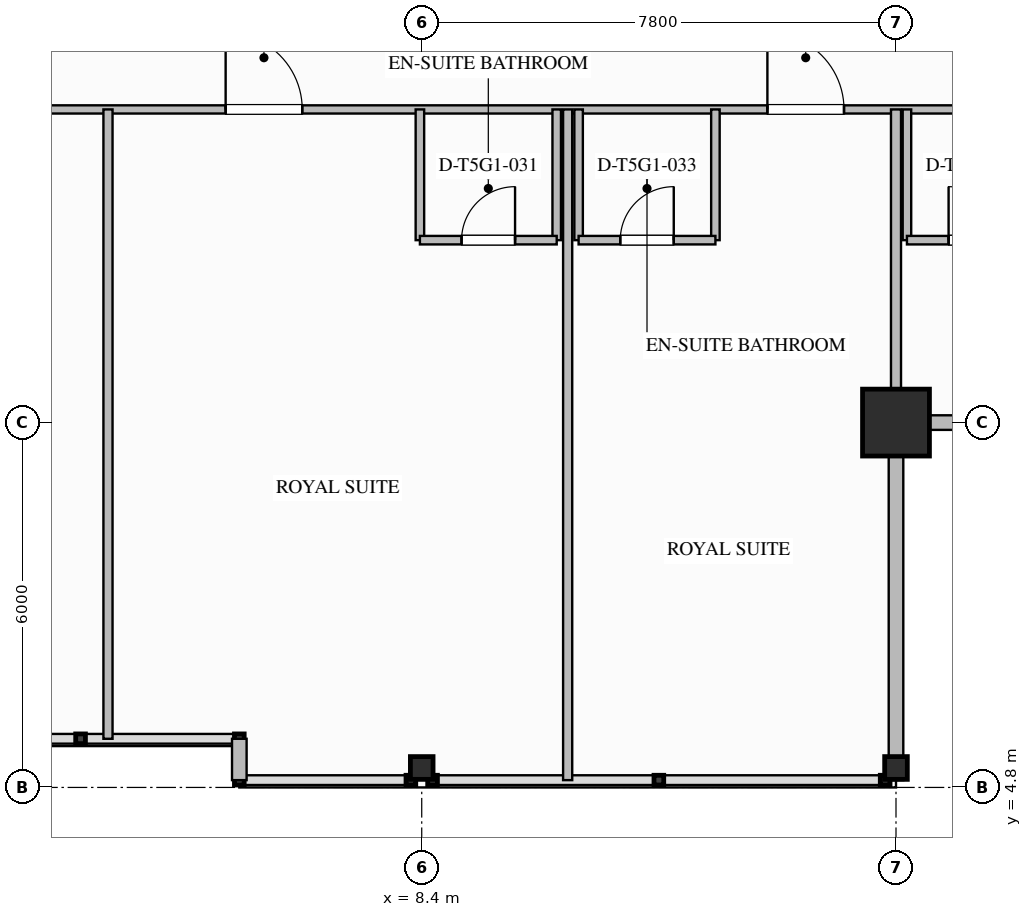
"""IFC4 building model, lengths in metres.
Left out: names, types, materials, properties, quantities, classifications, styles, units other than length and angle.
Written with IfcOpenShell. Run it as: python <this file> out.ifc"""

import sys

from ifc_helpers import new_model, si_unit, direction, frame, frame_2d, origin, origin_2d, place, context, subcontext, project, spatial, rectangle, i_section, extrude, element, fill, save


model = new_model("IFC4")
c1 = context("Model", 3, precision=1e-05, world=origin(), true_north=direction((0.0, 1.0)))
c2 = subcontext(c1, "Body", "Model", "MODEL_VIEW")
j1 = project(units=[si_unit("LENGTHUNIT", "METRE"), si_unit("PLANEANGLEUNIT", "RADIAN")], contexts=[c1])
p1 = place(None, origin())
s1 = spatial("IfcSite", under=j1, at=p1, CompositionType="ELEMENT")
p2 = place(p1, origin())
s2 = spatial("IfcBuilding", under=s1, at=p2, CompositionType="ELEMENT")
p3 = place(p2, frame((0.0, 0.0, 268.65)))
s3 = spatial("IfcBuildingStorey", under=s2, at=p3, CompositionType="ELEMENT", Elevation=268.65)
p4 = place(p3, frame((16.2, 10.8, 0.0), z_axis=(0.0, 0.0, 1.0), x_axis=(1.0, 0.0, 0.0)))
e1 = element("IfcColumn", 1, at=p4, inside=s3, PredefinedType="COLUMN", context=c2, shape_type="SweptSolid", body=[
    extrude(rectangle(XDim=1.1, YDim=1.1, at=origin_2d()), origin(), (0.0, 0.0, 1.0), 3.65),
])
for number, where, z_axis, x_axis in (
    (2, (8.4, 5.12, 0.0), (0.0, 0.0, 1.0), (0.0, 1.0, 0.0)),
    (3, (16.2, 5.12, 0.0), (0.0, 0.0, 1.0), (0.0, 1.0, 0.0)),
):
    element("IfcColumn", number, at=place(p3, frame(where, z_axis=z_axis, x_axis=x_axis)), inside=s3, PredefinedType="COLUMN", context=c2, shape_type="SweptSolid", body=[
        extrude(i_section(OverallWidth=0.374, OverallDepth=0.372, WebThickness=0.016, FlangeThickness=0.026, FilletRadius=0.025, at=origin_2d()), origin(), (0.0, 0.0, 1.0), 3.647),
    ])
for number, where, z_axis, x_axis in (
    (4, (22.08, 10.8, 0.0), (0.0, 0.0, 1.0), (-1.0, 0.0, 0.0)),
    (5, (16.2, 10.8, 0.0), (0.0, 0.0, 1.0), (0.0, -1.0, 0.0)),
):
    element("IfcWall", number, at=place(p3, frame(where, z_axis=z_axis, x_axis=x_axis)), inside=s3, PredefinedType="STANDARD", context=c2, shape_type="SweptSolid", body=[
        extrude(rectangle(XDim=5.88, YDim=0.24, at=frame_2d((2.94, 0.0))), origin(), (0.0, 0.0, 1.0), 2.779),
    ])
p5 = place(p3, frame((5.4, 4.92, 0.0), z_axis=(0.0, 0.0, 1.0), x_axis=(0.0, 1.0, 0.0)))
e6 = element("IfcWall", 6, at=p5, inside=s3, PredefinedType="STANDARD", context=c2, shape_type="SweptSolid", body=[
    extrude(rectangle(XDim=0.68, YDim=0.24, at=frame_2d((0.34, 0.0))), origin(), (0.0, 0.0, 1.0), 3.39),
])
p6 = place(p3, frame((-16.2, 15.95, 0.0), z_axis=(0.0, 0.0, 1.0), x_axis=(1.0, 0.0, 0.0)))
e7 = element("IfcWall", 7, at=p6, inside=s3, PredefinedType="PARTITIONING", context=c2, shape_type="SweptSolid", body=[
    extrude(rectangle(XDim=38.28, YDim=0.135, at=frame_2d((19.14, 0.0))), origin(), (0.0, 0.0, 1.0), 3.39),
])
p7 = place(p6, frame((35.785, 0.0, 0.0)))
e8 = element("IfcOpeningElement", 8, at=p7, cuts=e7, PredefinedType="OPENING", context=c2, shape_type="SweptSolid", body=[
    extrude(rectangle(XDim=1.26, YDim=2.2, at=frame_2d((0.63, 1.1))), frame((0.0, 0.077, 0.0), z_axis=(0.0, -1.0, 0.0), x_axis=(1.0, 0.0, 0.0)), (0.0, 0.0, 1.0), 0.155),
])
p8 = place(p6, frame((3.285, 0.0, 0.0)))
e9 = element("IfcOpeningElement", 9, at=p8, cuts=e7, PredefinedType="OPENING", context=c2, shape_type="SweptSolid", body=[
    extrude(rectangle(XDim=1.26, YDim=2.2, at=frame_2d((0.63, 1.1))), frame((0.0, 0.077, 0.0), z_axis=(0.0, -1.0, 0.0), x_axis=(1.0, 0.0, 0.0)), (0.0, 0.0, 1.0), 0.155),
])
p9 = place(p6, frame((7.335, 0.0, 0.0)))
e10 = element("IfcOpeningElement", 10, at=p9, cuts=e7, PredefinedType="OPENING", context=c2, shape_type="SweptSolid", body=[
    extrude(rectangle(XDim=1.26, YDim=2.2, at=frame_2d((0.63, 1.1))), frame((0.0, 0.077, 0.0), z_axis=(0.0, -1.0, 0.0), x_axis=(1.0, 0.0, 0.0)), (0.0, 0.0, 1.0), 0.155),
])
p10 = place(p6, frame((15.69, 0.0, 0.0)))
e11 = element("IfcOpeningElement", 11, at=p10, cuts=e7, PredefinedType="OPENING", context=c2, shape_type="SweptSolid", body=[
    extrude(rectangle(XDim=1.02, YDim=2.15, at=frame_2d((0.51, 1.075))), frame((0.0, 0.077, 0.0), z_axis=(0.0, -1.0, 0.0), x_axis=(1.0, 0.0, 0.0)), (0.0, 0.0, 1.0), 0.155),
])
p11 = place(p6, frame((21.375, 0.0, 0.0)))
e12 = element("IfcOpeningElement", 12, at=p11, cuts=e7, PredefinedType="OPENING", context=c2, shape_type="SweptSolid", body=[
    extrude(rectangle(XDim=1.26, YDim=2.2, at=frame_2d((0.63, 1.1))), frame((0.0, 0.077, 0.0), z_axis=(0.0, -1.0, 0.0), x_axis=(1.0, 0.0, 0.0)), (0.0, 0.0, 1.0), 0.155),
])
p12 = place(p6, frame((30.285, 0.0, 0.0)))
e13 = element("IfcOpeningElement", 13, at=p12, cuts=e7, PredefinedType="OPENING", context=c2, shape_type="SweptSolid", body=[
    extrude(rectangle(XDim=1.26, YDim=2.2, at=frame_2d((0.63, 1.1))), frame((0.0, 0.077, 0.0), z_axis=(0.0, -1.0, 0.0), x_axis=(1.0, 0.0, 0.0)), (0.0, 0.0, 1.0), 0.155),
])
p13 = place(p3, frame((16.2, 10.92, 0.0), z_axis=(0.0, 0.0, 1.0), x_axis=(0.0, 1.0, 0.0)))
e14 = element("IfcWall", 14, at=p13, inside=s3, PredefinedType="PARTITIONING", context=c2, shape_type="SweptSolid", body=[
    extrude(rectangle(XDim=5.03, YDim=0.165, at=frame_2d((2.515, 0.0))), origin(), (0.0, 0.0, 1.0), 2.764),
])
p14 = place(p3, frame((16.38, 15.95, 0.0), z_axis=(0.0, 0.0, 1.0), x_axis=(0.0, -1.0, 0.0)))
e15 = element("IfcWall", 15, at=p14, inside=s3, PredefinedType="PLUMBINGWALL", context=c2, shape_type="SweptSolid", body=[
    extrude(rectangle(XDim=2.15, YDim=0.14, at=frame_2d((1.075, 0.0))), origin(), (0.0, 0.0, 1.0), 2.764),
])
p15 = place(p3, frame((16.38, 13.8, 0.0), z_axis=(0.0, 0.0, 1.0), x_axis=(1.0, 0.0, 0.0)))
e16 = element("IfcWall", 16, at=p15, inside=s3, PredefinedType="PLUMBINGWALL", context=c2, shape_type="SweptSolid", body=[
    extrude(rectangle(XDim=2.25, YDim=0.14, at=frame_2d((1.125, 0.0))), origin(), (0.0, 0.0, 1.0), 3.39),
])
p16 = place(p15, frame((0.685, 0.0, 0.0)))
e17 = element("IfcOpeningElement", 17, at=p16, cuts=e16, PredefinedType="OPENING", context=c2, shape_type="SweptSolid", body=[
    extrude(rectangle(XDim=0.88, YDim=2.1, at=frame_2d((0.44, 1.05))), frame((0.0, 0.08, 0.0), z_axis=(0.0, -1.0, 0.0), x_axis=(1.0, 0.0, 0.0)), (0.0, 0.0, 1.0), 0.16),
])
p17 = place(p3, frame((3.24, 5.6, 0.0), z_axis=(0.0, 0.0, 1.0), x_axis=(0.0, 1.0, 0.0)))
e18 = element("IfcWall", 18, at=p17, inside=s3, PredefinedType="PARTITIONING", context=c2, shape_type="SweptSolid", body=[
    extrude(rectangle(XDim=10.35, YDim=0.15, at=frame_2d((5.175, 0.0))), origin(), (0.0, 0.0, 1.0), 3.39),
])
p18 = place(p3, frame((8.37, 15.95, 0.0), z_axis=(0.0, 0.0, 1.0), x_axis=(0.0, -1.0, 0.0)))
e19 = element("IfcWall", 19, at=p18, inside=s3, PredefinedType="PLUMBINGWALL", context=c2, shape_type="SweptSolid", body=[
    extrude(rectangle(XDim=2.15, YDim=0.14, at=frame_2d((1.075, 0.0))), origin(), (0.0, 0.0, 1.0), 2.768),
])
p19 = place(p3, frame((10.62, 15.95, 0.0), z_axis=(0.0, 0.0, 1.0), x_axis=(0.0, -1.0, 0.0)))
e20 = element("IfcWall", 20, at=p19, inside=s3, PredefinedType="PLUMBINGWALL", context=c2, shape_type="SweptSolid", body=[
    extrude(rectangle(XDim=2.15, YDim=0.14, at=frame_2d((1.075, 0.0))), origin(), (0.0, 0.0, 1.0), 3.39),
])
p20 = place(p3, frame((8.37, 13.8, 0.0), z_axis=(0.0, 0.0, 1.0), x_axis=(1.0, 0.0, 0.0)))
e21 = element("IfcWall", 21, at=p20, inside=s3, PredefinedType="PLUMBINGWALL", context=c2, shape_type="SweptSolid", body=[
    extrude(rectangle(XDim=2.25, YDim=0.14, at=frame_2d((1.125, 0.0))), origin(), (0.0, 0.0, 1.0), 3.39),
])
p21 = place(p20, frame((0.685, 0.0, 0.0)))
e22 = element("IfcOpeningElement", 22, at=p21, cuts=e21, PredefinedType="OPENING", context=c2, shape_type="SweptSolid", body=[
    extrude(rectangle(XDim=0.88, YDim=2.1, at=frame_2d((0.44, 1.05))), frame((0.0, 0.08, 0.0), z_axis=(0.0, -1.0, 0.0), x_axis=(1.0, 0.0, 0.0)), (0.0, 0.0, 1.0), 0.16),
])
p22 = place(p3, frame((10.8, 4.92, 0.0), z_axis=(0.0, 0.0, 1.0), x_axis=(0.0, 1.0, 0.0)))
e23 = element("IfcWall", 23, at=p22, inside=s3, PredefinedType="PARTITIONING", context=c2, shape_type="SweptSolid", body=[
    extrude(rectangle(XDim=11.03, YDim=0.15, at=frame_2d((5.515, 0.0))), origin(), (0.0, 0.0, 1.0), 3.39),
])
for number, where, z_axis, x_axis in (
    (24, (10.98, 15.95, 0.0), (0.0, 0.0, 1.0), (0.0, -1.0, 0.0)),
    (25, (13.23, 15.95, 0.0), (0.0, 0.0, 1.0), (0.0, -1.0, 0.0)),
):
    element("IfcWall", number, at=place(p3, frame(where, z_axis=z_axis, x_axis=x_axis)), inside=s3, PredefinedType="PLUMBINGWALL", context=c2, shape_type="SweptSolid", body=[
        extrude(rectangle(XDim=2.15, YDim=0.14, at=frame_2d((1.075, 0.0))), origin(), (0.0, 0.0, 1.0), 3.39),
    ])
p23 = place(p3, frame((10.98, 13.8, 0.0), z_axis=(0.0, 0.0, 1.0), x_axis=(1.0, 0.0, 0.0)))
e26 = element("IfcWall", 26, at=p23, inside=s3, PredefinedType="PLUMBINGWALL", context=c2, shape_type="SweptSolid", body=[
    extrude(rectangle(XDim=2.25, YDim=0.14, at=frame_2d((1.125, 0.0))), origin(), (0.0, 0.0, 1.0), 3.39),
])
p24 = place(p23, frame((0.685, 0.0, 0.0)))
e27 = element("IfcOpeningElement", 27, at=p24, cuts=e26, PredefinedType="OPENING", context=c2, shape_type="SweptSolid", body=[
    extrude(rectangle(XDim=0.88, YDim=2.1, at=frame_2d((0.44, 1.05))), frame((0.0, 0.08, 0.0), z_axis=(0.0, -1.0, 0.0), x_axis=(1.0, 0.0, 0.0)), (0.0, 0.0, 1.0), 0.16),
])
p25 = place(p16, origin())
e28 = element("IfcDoor", 28, at=p25, inside=s3, OperationType="SINGLE_SWING_LEFT", PredefinedType="DOOR", context=c2, shape_type="SweptSolid", body=[
    extrude(rectangle(XDim=0.88, YDim=2.1, at=frame_2d((0.44, 1.05))), frame((0.0, 0.025, 0.0), z_axis=(0.0, -1.0, 0.0), x_axis=(1.0, 0.0, 0.0)), (0.0, 0.0, 1.0), 0.05),
])
fill(e17, e28)
p26 = place(p21, origin())
e29 = element("IfcDoor", 29, at=p26, inside=s3, OperationType="SINGLE_SWING_RIGHT", PredefinedType="DOOR", context=c2, shape_type="SweptSolid", body=[
    extrude(rectangle(XDim=0.88, YDim=2.1, at=frame_2d((0.44, 1.05))), frame((0.0, 0.025, 0.0), z_axis=(0.0, -1.0, 0.0), x_axis=(1.0, 0.0, 0.0)), (0.0, 0.0, 1.0), 0.05),
])
fill(e22, e29)
p27 = place(p11, origin())
e30 = element("IfcDoor", 30, at=p27, inside=s3, OperationType="SINGLE_SWING_LEFT", PredefinedType="DOOR", context=c2, shape_type="SweptSolid", body=[
    extrude(rectangle(XDim=1.26, YDim=2.2, at=frame_2d((0.63, 1.1))), frame((0.0, 0.025, 0.0), z_axis=(0.0, -1.0, 0.0), x_axis=(1.0, 0.0, 0.0)), (0.0, 0.0, 1.0), 0.05),
])
fill(e12, e30)
p28 = place(p24, origin())
e31 = element("IfcDoor", 31, at=p28, inside=s3, OperationType="SINGLE_SWING_RIGHT", PredefinedType="DOOR", context=c2, shape_type="SweptSolid", body=[
    extrude(rectangle(XDim=0.88, YDim=2.1, at=frame_2d((0.44, 1.05))), frame((0.0, 0.025, 0.0), z_axis=(0.0, -1.0, 0.0), x_axis=(1.0, 0.0, 0.0)), (0.0, 0.0, 1.0), 0.05),
])
fill(e27, e31)
p29 = place(p12, origin())
e32 = element("IfcDoor", 32, at=p29, inside=s3, OperationType="SINGLE_SWING_LEFT", PredefinedType="DOOR", context=c2, shape_type="SweptSolid", body=[
    extrude(rectangle(XDim=1.26, YDim=2.2, at=frame_2d((0.63, 1.1))), frame((0.0, 0.025, 0.0), z_axis=(0.0, -1.0, 0.0), x_axis=(1.0, 0.0, 0.0)), (0.0, 0.0, 1.0), 0.05),
])
fill(e13, e32)
save(model, sys.argv[1])
